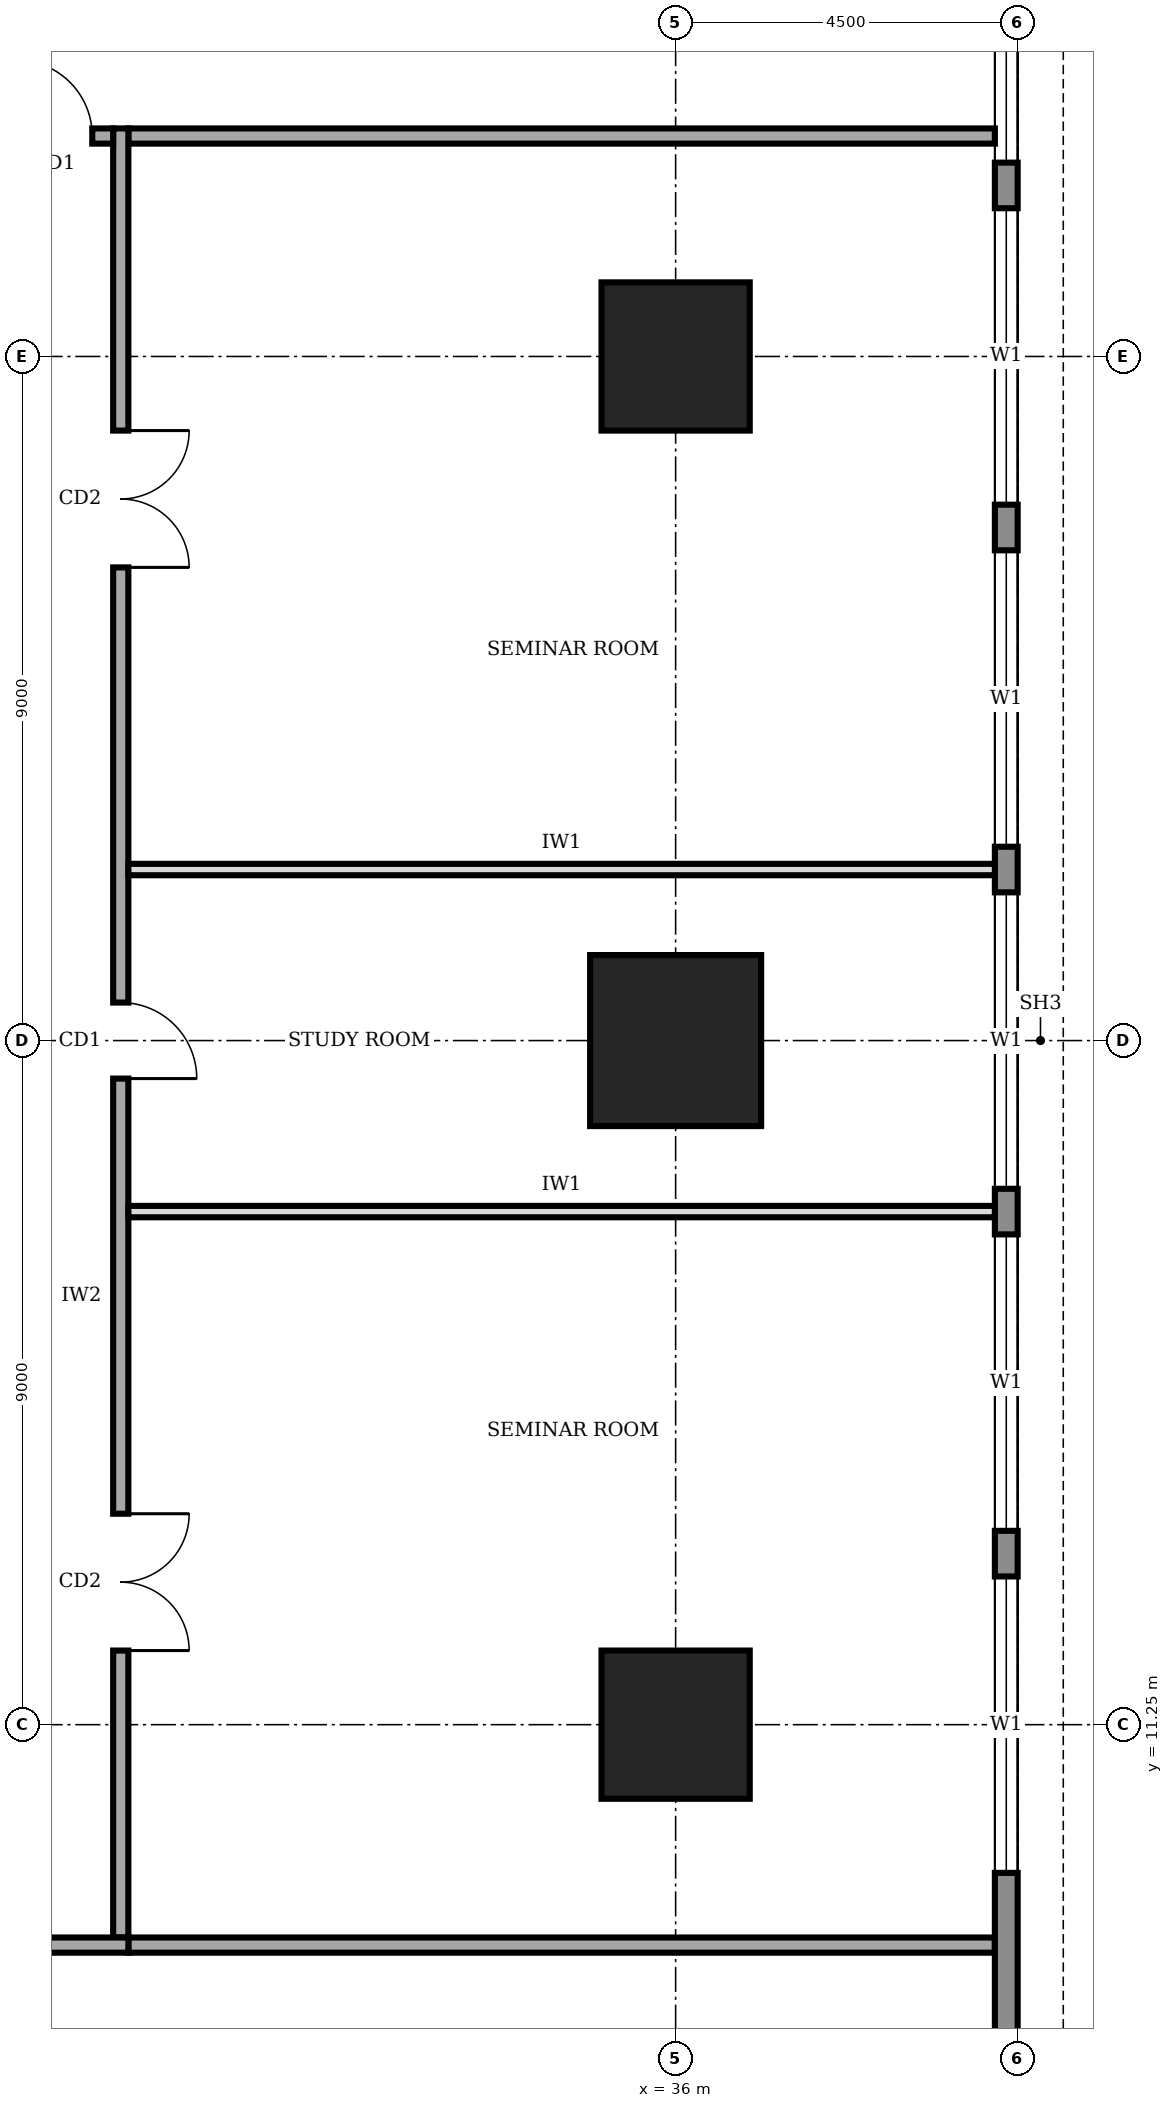
"""IFC4 building model, lengths in metres.
Left out: names, types, materials, properties, quantities, classifications, styles, units other than length and angle.
Written with IfcOpenShell. Run it as: python <this file> out.ifc"""

import sys

from ifc_helpers import new_model, si_unit, direction, frame, frame_2d, origin, origin_2d, place, context, subcontext, project, spatial, rectangle, extrude, element, fill, save


model = new_model("IFC4")
c1 = context("Model", 3, precision=1e-05, world=origin(), true_north=direction((0.0, 1.0)))
c2 = subcontext(c1, "Body", "Model", "MODEL_VIEW")
j1 = project(units=[si_unit("LENGTHUNIT", "METRE"), si_unit("PLANEANGLEUNIT", "RADIAN")], contexts=[c1])
p1 = place(None, origin())
s1 = spatial("IfcSite", under=j1, at=p1, CompositionType="ELEMENT")
p2 = place(p1, origin())
s2 = spatial("IfcBuilding", under=s1, at=p2, CompositionType="ELEMENT")
p3 = place(p2, frame((0.0, 0.0, 225.0)))
s3 = spatial("IfcBuildingStorey", under=s2, at=p3, CompositionType="ELEMENT", Elevation=225.0)
p4 = place(p3, frame((36.0, 11.25, 0.0), z_axis=(0.0, 0.0, 1.0), x_axis=(1.0, 0.0, 0.0)))
e1 = element("IfcColumn", 1, at=p4, inside=s3, PredefinedType="COLUMN", context=c2, shape_type="SweptSolid", body=[
    extrude(rectangle(XDim=1.95, YDim=1.95, at=origin_2d()), origin(), (0.0, 0.0, 1.0), 4.0),
])
p5 = place(p3, frame((36.0, 20.25, 0.0), z_axis=(0.0, 0.0, 1.0), x_axis=(1.0, 0.0, 0.0)))
e2 = element("IfcColumn", 2, at=p5, inside=s3, PredefinedType="COLUMN", context=c2, shape_type="SweptSolid", body=[
    extrude(rectangle(XDim=2.25, YDim=2.25, at=origin_2d()), origin(), (0.0, 0.0, 1.0), 4.0),
])
p6 = place(p3, frame((36.0, 29.25, 0.0), z_axis=(0.0, 0.0, 1.0), x_axis=(1.0, 0.0, 0.0)))
e3 = element("IfcColumn", 3, at=p6, inside=s3, PredefinedType="COLUMN", context=c2, shape_type="SweptSolid", body=[
    extrude(rectangle(XDim=1.95, YDim=1.95, at=origin_2d()), origin(), (0.0, 0.0, 1.0), 4.0),
])
p7 = place(p3, frame((40.35, 4.52, 0.0), z_axis=(0.0, 0.0, 1.0), x_axis=(0.0, 1.0, 0.0)))
e4 = element("IfcWall", 4, at=p7, inside=s3, PredefinedType="STANDARD", context=c2, shape_type="SweptSolid", body=[
    extrude(rectangle(XDim=31.46, YDim=0.3, at=frame_2d((15.73, 0.0))), origin(), (0.0, 0.0, 1.0), 3.75),
])
p8 = place(p7, frame((4.78, 0.0, 0.9)))
e5 = element("IfcOpeningElement", 5, at=p8, cuts=e4, PredefinedType="OPENING", context=c2, shape_type="SweptSolid", body=[
    extrude(rectangle(XDim=3.9, YDim=2.2, at=frame_2d((1.95, 1.1))), frame((0.0, 0.16, 0.0), z_axis=(0.0, -1.0, 0.0), x_axis=(1.0, 0.0, 0.0)), (0.0, 0.0, 1.0), 0.32),
])
p9 = place(p7, frame((9.28, 0.0, 0.9)))
e6 = element("IfcOpeningElement", 6, at=p9, cuts=e4, PredefinedType="OPENING", context=c2, shape_type="SweptSolid", body=[
    extrude(rectangle(XDim=3.9, YDim=2.2, at=frame_2d((1.95, 1.1))), frame((0.0, 0.16, 0.0), z_axis=(0.0, -1.0, 0.0), x_axis=(1.0, 0.0, 0.0)), (0.0, 0.0, 1.0), 0.32),
])
p10 = place(p7, frame((13.78, 0.0, 0.9)))
e7 = element("IfcOpeningElement", 7, at=p10, cuts=e4, PredefinedType="OPENING", context=c2, shape_type="SweptSolid", body=[
    extrude(rectangle(XDim=3.9, YDim=2.2, at=frame_2d((1.95, 1.1))), frame((0.0, 0.16, 0.0), z_axis=(0.0, -1.0, 0.0), x_axis=(1.0, 0.0, 0.0)), (0.0, 0.0, 1.0), 0.32),
])
p11 = place(p7, frame((18.28, 0.0, 0.9)))
e8 = element("IfcOpeningElement", 8, at=p11, cuts=e4, PredefinedType="OPENING", context=c2, shape_type="SweptSolid", body=[
    extrude(rectangle(XDim=3.9, YDim=2.2, at=frame_2d((1.95, 1.1))), frame((0.0, 0.16, 0.0), z_axis=(0.0, -1.0, 0.0), x_axis=(1.0, 0.0, 0.0)), (0.0, 0.0, 1.0), 0.32),
])
p12 = place(p7, frame((22.78, 0.0, 0.9)))
e9 = element("IfcOpeningElement", 9, at=p12, cuts=e4, PredefinedType="OPENING", context=c2, shape_type="SweptSolid", body=[
    extrude(rectangle(XDim=3.9, YDim=2.2, at=frame_2d((1.95, 1.1))), frame((0.0, 0.16, 0.0), z_axis=(0.0, -1.0, 0.0), x_axis=(1.0, 0.0, 0.0)), (0.0, 0.0, 1.0), 0.32),
])
p13 = place(p7, frame((27.28, 0.0, 0.9)))
e10 = element("IfcOpeningElement", 10, at=p13, cuts=e4, PredefinedType="OPENING", context=c2, shape_type="SweptSolid", body=[
    extrude(rectangle(XDim=3.9, YDim=2.2, at=frame_2d((1.95, 1.1))), frame((0.0, 0.16, 0.0), z_axis=(0.0, -1.0, 0.0), x_axis=(1.0, 0.0, 0.0)), (0.0, 0.0, 1.0), 0.32),
])
p14 = place(p3, frame((11.9, 8.35, 0.0), z_axis=(0.0, 0.0, 1.0), x_axis=(1.0, 0.0, 0.0)))
e11 = element("IfcWall", 11, at=p14, inside=s3, PredefinedType="SOLIDWALL", context=c2, shape_type="SweptSolid", body=[
    extrude(rectangle(XDim=16.9, YDim=0.2, at=frame_2d((8.45, 0.0))), origin(), (0.0, 0.0, 1.0), 3.75),
])
p15 = place(p14, frame((2.05, 0.0, 0.0)))
e12 = element("IfcOpeningElement", 12, at=p15, cuts=e11, PredefinedType="OPENING", context=c2, shape_type="SweptSolid", body=[
    extrude(rectangle(XDim=1.8, YDim=2.1, at=frame_2d((0.9, 1.05))), frame((0.0, 0.11, 0.0), z_axis=(0.0, -1.0, 0.0), x_axis=(1.0, 0.0, 0.0)), (0.0, 0.0, 1.0), 0.22),
])
p16 = place(p14, frame((10.6, 0.0, 0.0)))
e13 = element("IfcOpeningElement", 13, at=p16, cuts=e11, PredefinedType="OPENING", context=c2, shape_type="SweptSolid", body=[
    extrude(rectangle(XDim=1.8, YDim=2.1, at=frame_2d((0.9, 1.05))), frame((0.0, 0.11, 0.0), z_axis=(0.0, -1.0, 0.0), x_axis=(1.0, 0.0, 0.0)), (0.0, 0.0, 1.0), 0.22),
])
p17 = place(p3, frame((28.7, 8.45, 0.0), z_axis=(0.0, 0.0, 1.0), x_axis=(0.0, 1.0, 0.0)))
e14 = element("IfcWall", 14, at=p17, inside=s3, PredefinedType="SOLIDWALL", context=c2, shape_type="SweptSolid", body=[
    extrude(rectangle(XDim=23.8, YDim=0.2, at=frame_2d((11.9, 0.0))), origin(), (0.0, 0.0, 1.0), 3.75),
])
p18 = place(p17, frame((3.775, 0.0, 0.0)))
e15 = element("IfcOpeningElement", 15, at=p18, cuts=e14, PredefinedType="OPENING", context=c2, shape_type="SweptSolid", body=[
    extrude(rectangle(XDim=1.8, YDim=2.1, at=frame_2d((0.9, 1.05))), frame((0.0, 0.11, 0.0), z_axis=(0.0, -1.0, 0.0), x_axis=(1.0, 0.0, 0.0)), (0.0, 0.0, 1.0), 0.22),
])
p19 = place(p17, frame((11.3, 0.0, 0.0)))
e16 = element("IfcOpeningElement", 16, at=p19, cuts=e14, PredefinedType="OPENING", context=c2, shape_type="SweptSolid", body=[
    extrude(rectangle(XDim=1.0, YDim=2.1, at=frame_2d((0.5, 1.05))), frame((0.0, 0.11, 0.0), z_axis=(0.0, -1.0, 0.0), x_axis=(1.0, 0.0, 0.0)), (0.0, 0.0, 1.0), 0.22),
])
p20 = place(p17, frame((18.025, 0.0, 0.0)))
e17 = element("IfcOpeningElement", 17, at=p20, cuts=e14, PredefinedType="OPENING", context=c2, shape_type="SweptSolid", body=[
    extrude(rectangle(XDim=1.8, YDim=2.1, at=frame_2d((0.9, 1.05))), frame((0.0, 0.11, 0.0), z_axis=(0.0, -1.0, 0.0), x_axis=(1.0, 0.0, 0.0)), (0.0, 0.0, 1.0), 0.22),
])
p21 = place(p3, frame((28.6, 32.15, 0.0), z_axis=(0.0, 0.0, 1.0), x_axis=(-1.0, 0.0, 0.0)))
e18 = element("IfcWall", 18, at=p21, inside=s3, PredefinedType="SOLIDWALL", context=c2, shape_type="SweptSolid", body=[
    extrude(rectangle(XDim=16.9, YDim=0.2, at=frame_2d((8.45, 0.0))), origin(), (0.0, 0.0, 1.0), 3.75),
])
p22 = place(p21, frame((15.425, 0.0, 0.0)))
e19 = element("IfcOpeningElement", 19, at=p22, cuts=e18, PredefinedType="OPENING", context=c2, shape_type="SweptSolid", body=[
    extrude(rectangle(XDim=1.0, YDim=2.1, at=frame_2d((0.5, 1.05))), frame((0.0, 0.11, 0.0), z_axis=(0.0, -1.0, 0.0), x_axis=(1.0, 0.0, 0.0)), (0.0, 0.0, 1.0), 0.22),
])
p23 = place(p21, frame((12.35, 0.0, 0.0)))
e20 = element("IfcOpeningElement", 20, at=p23, cuts=e18, PredefinedType="OPENING", context=c2, shape_type="SweptSolid", body=[
    extrude(rectangle(XDim=1.0, YDim=2.1, at=frame_2d((0.5, 1.05))), frame((0.0, 0.11, 0.0), z_axis=(0.0, -1.0, 0.0), x_axis=(1.0, 0.0, 0.0)), (0.0, 0.0, 1.0), 0.22),
])
p24 = place(p21, frame((5.6, 0.0, 0.0)))
e21 = element("IfcOpeningElement", 21, at=p24, cuts=e18, PredefinedType="OPENING", context=c2, shape_type="SweptSolid", body=[
    extrude(rectangle(XDim=1.0, YDim=2.1, at=frame_2d((0.5, 1.05))), frame((0.0, 0.11, 0.0), z_axis=(0.0, -1.0, 0.0), x_axis=(1.0, 0.0, 0.0)), (0.0, 0.0, 1.0), 0.22),
])
p25 = place(p21, frame((0.275, 0.0, 0.0)))
e22 = element("IfcOpeningElement", 22, at=p25, cuts=e18, PredefinedType="OPENING", context=c2, shape_type="SweptSolid", body=[
    extrude(rectangle(XDim=1.0, YDim=2.1, at=frame_2d((0.5, 1.05))), frame((0.0, 0.11, 0.0), z_axis=(0.0, -1.0, 0.0), x_axis=(1.0, 0.0, 0.0)), (0.0, 0.0, 1.0), 0.22),
])
for number, where, z_axis, x_axis in (
    (23, (28.8, 8.35, 0.0), (0.0, 0.0, 1.0), (1.0, 0.0, 0.0)),
    (24, (28.8, 32.15, 0.0), (0.0, 0.0, 1.0), (1.0, 0.0, 0.0)),
):
    element("IfcWall", number, at=place(p3, frame(where, z_axis=z_axis, x_axis=x_axis)), inside=s3, PredefinedType="SOLIDWALL", context=c2, shape_type="SweptSolid", body=[
        extrude(rectangle(XDim=11.4, YDim=0.2, at=frame_2d((5.7, 0.0))), origin(), (0.0, 0.0, 1.0), 3.75),
    ])
for number, where, z_axis, x_axis in (
    (25, (28.8, 18.0, 0.0), (0.0, 0.0, 1.0), (1.0, 0.0, 0.0)),
    (26, (28.8, 22.5, 0.0), (0.0, 0.0, 1.0), (1.0, 0.0, 0.0)),
):
    element("IfcWall", number, at=place(p3, frame(where, z_axis=z_axis, x_axis=x_axis)), inside=s3, PredefinedType="PARTITIONING", context=c2, shape_type="SweptSolid", body=[
        extrude(rectangle(XDim=11.4, YDim=0.15, at=frame_2d((5.7, 0.0))), origin(), (0.0, 0.0, 1.0), 3.75),
    ])
p26 = place(p8, origin())
e27 = element("IfcWindow", 27, at=p26, inside=s3, PartitioningType="SINGLE_PANEL", PredefinedType="WINDOW", context=c2, shape_type="SweptSolid", body=[
    extrude(rectangle(XDim=3.9, YDim=2.2, at=frame_2d((1.95, 1.1))), frame((0.0, 0.03, 0.0), z_axis=(0.0, -1.0, 0.0), x_axis=(1.0, 0.0, 0.0)), (0.0, 0.0, 1.0), 0.06),
])
fill(e5, e27)
p27 = place(p9, origin())
e28 = element("IfcWindow", 28, at=p27, inside=s3, PartitioningType="SINGLE_PANEL", PredefinedType="WINDOW", context=c2, shape_type="SweptSolid", body=[
    extrude(rectangle(XDim=3.9, YDim=2.2, at=frame_2d((1.95, 1.1))), frame((0.0, 0.03, 0.0), z_axis=(0.0, -1.0, 0.0), x_axis=(1.0, 0.0, 0.0)), (0.0, 0.0, 1.0), 0.06),
])
fill(e6, e28)
p28 = place(p10, origin())
e29 = element("IfcWindow", 29, at=p28, inside=s3, PartitioningType="SINGLE_PANEL", PredefinedType="WINDOW", context=c2, shape_type="SweptSolid", body=[
    extrude(rectangle(XDim=3.9, YDim=2.2, at=frame_2d((1.95, 1.1))), frame((0.0, 0.03, 0.0), z_axis=(0.0, -1.0, 0.0), x_axis=(1.0, 0.0, 0.0)), (0.0, 0.0, 1.0), 0.06),
])
fill(e7, e29)
p29 = place(p11, origin())
e30 = element("IfcWindow", 30, at=p29, inside=s3, PartitioningType="SINGLE_PANEL", PredefinedType="WINDOW", context=c2, shape_type="SweptSolid", body=[
    extrude(rectangle(XDim=3.9, YDim=2.2, at=frame_2d((1.95, 1.1))), frame((0.0, 0.03, 0.0), z_axis=(0.0, -1.0, 0.0), x_axis=(1.0, 0.0, 0.0)), (0.0, 0.0, 1.0), 0.06),
])
fill(e8, e30)
p30 = place(p12, origin())
e31 = element("IfcWindow", 31, at=p30, inside=s3, PartitioningType="SINGLE_PANEL", PredefinedType="WINDOW", context=c2, shape_type="SweptSolid", body=[
    extrude(rectangle(XDim=3.9, YDim=2.2, at=frame_2d((1.95, 1.1))), frame((0.0, 0.03, 0.0), z_axis=(0.0, -1.0, 0.0), x_axis=(1.0, 0.0, 0.0)), (0.0, 0.0, 1.0), 0.06),
])
fill(e9, e31)
p31 = place(p13, origin())
e32 = element("IfcWindow", 32, at=p31, inside=s3, PartitioningType="SINGLE_PANEL", PredefinedType="WINDOW", context=c2, shape_type="SweptSolid", body=[
    extrude(rectangle(XDim=3.9, YDim=2.2, at=frame_2d((1.95, 1.1))), frame((0.0, 0.03, 0.0), z_axis=(0.0, -1.0, 0.0), x_axis=(1.0, 0.0, 0.0)), (0.0, 0.0, 1.0), 0.06),
])
fill(e10, e32)
p32 = place(p18, frame((1.8, 0.0, 0.0), z_axis=(0.0, 0.0, 1.0), x_axis=(-1.0, 0.0, 0.0)))
e33 = element("IfcDoor", 33, at=p32, inside=s3, OperationType="DOUBLE_DOOR_SINGLE_SWING", PredefinedType="DOOR", context=c2, shape_type="SweptSolid", body=[
    extrude(rectangle(XDim=1.8, YDim=2.1, at=frame_2d((0.9, 1.05))), frame((0.0, 0.025, 0.0), z_axis=(0.0, -1.0, 0.0), x_axis=(1.0, 0.0, 0.0)), (0.0, 0.0, 1.0), 0.05),
])
fill(e15, e33)
p33 = place(p19, frame((1.0, 0.0, 0.0), z_axis=(0.0, 0.0, 1.0), x_axis=(-1.0, 0.0, 0.0)))
e34 = element("IfcDoor", 34, at=p33, inside=s3, OperationType="SINGLE_SWING_RIGHT", PredefinedType="DOOR", context=c2, shape_type="SweptSolid", body=[
    extrude(rectangle(XDim=1.0, YDim=2.1, at=frame_2d((0.5, 1.05))), frame((0.0, 0.025, 0.0), z_axis=(0.0, -1.0, 0.0), x_axis=(1.0, 0.0, 0.0)), (0.0, 0.0, 1.0), 0.05),
])
fill(e16, e34)
p34 = place(p20, frame((1.8, 0.0, 0.0), z_axis=(0.0, 0.0, 1.0), x_axis=(-1.0, 0.0, 0.0)))
e35 = element("IfcDoor", 35, at=p34, inside=s3, OperationType="DOUBLE_DOOR_SINGLE_SWING", PredefinedType="DOOR", context=c2, shape_type="SweptSolid", body=[
    extrude(rectangle(XDim=1.8, YDim=2.1, at=frame_2d((0.9, 1.05))), frame((0.0, 0.025, 0.0), z_axis=(0.0, -1.0, 0.0), x_axis=(1.0, 0.0, 0.0)), (0.0, 0.0, 1.0), 0.05),
])
fill(e17, e35)
p35 = place(p25, frame((1.0, 0.0, 0.0), z_axis=(0.0, 0.0, 1.0), x_axis=(-1.0, 0.0, 0.0)))
e36 = element("IfcDoor", 36, at=p35, inside=s3, OperationType="SINGLE_SWING_LEFT", PredefinedType="DOOR", context=c2, shape_type="SweptSolid", body=[
    extrude(rectangle(XDim=1.0, YDim=2.1, at=frame_2d((0.5, 1.05))), frame((0.0, 0.025, 0.0), z_axis=(0.0, -1.0, 0.0), x_axis=(1.0, 0.0, 0.0)), (0.0, 0.0, 1.0), 0.05),
])
fill(e22, e36)
save(model, sys.argv[1])
